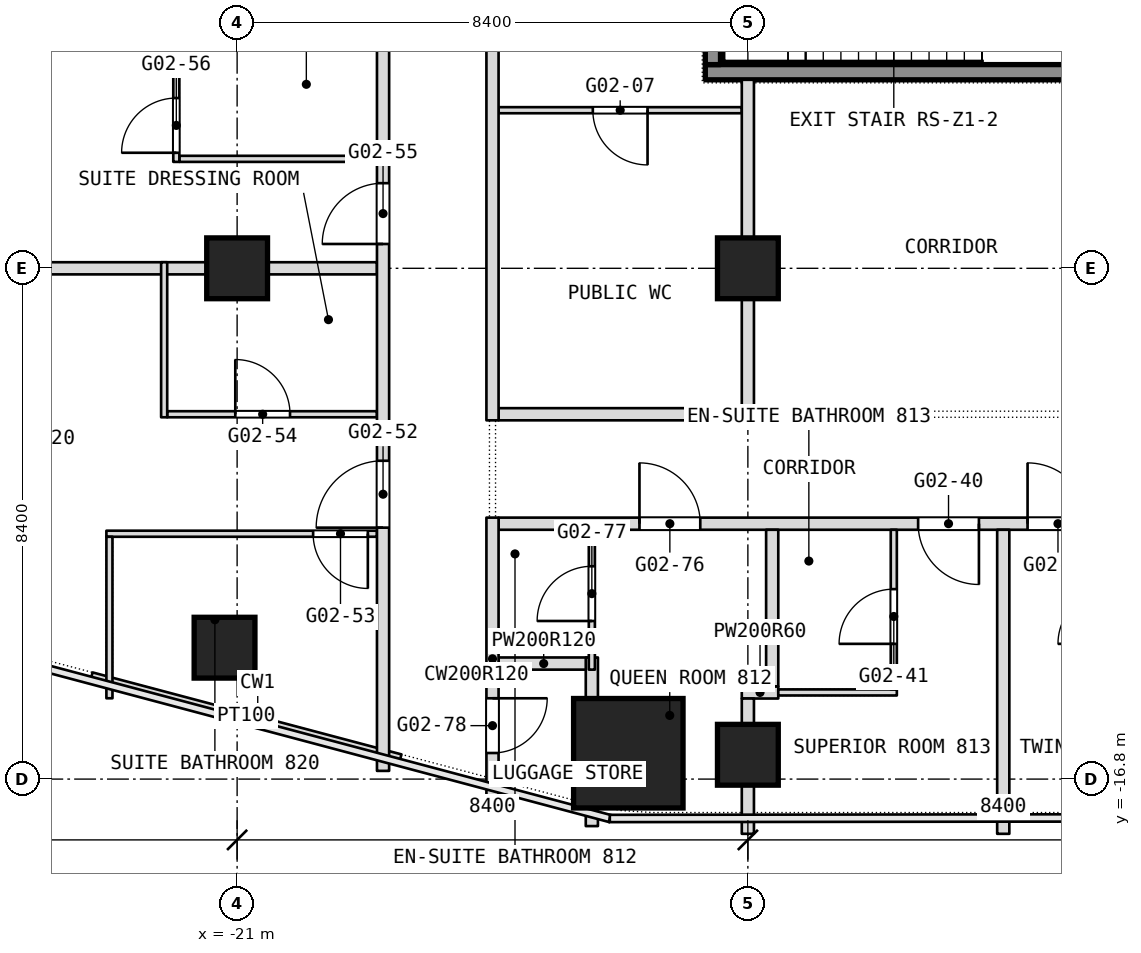
"""IFC4 building model, lengths in metres.
Left out: names, types, materials, properties, quantities, classifications, styles, units other than length and angle.
Written with IfcOpenShell. Run it as: python <this file> out.ifc"""

import sys

from ifc_helpers import new_model, si_unit, direction, frame, frame_2d, origin, origin_2d, place, context, subcontext, project, spatial, rectangle, extrude, element, fill, save


model = new_model("IFC4")
c1 = context("Model", 3, precision=1e-05, world=origin(), true_north=direction((0.0, 1.0)))
c2 = subcontext(c1, "Body", "Model", "MODEL_VIEW")
j1 = project(units=[si_unit("LENGTHUNIT", "METRE"), si_unit("PLANEANGLEUNIT", "RADIAN")], contexts=[c1])
p1 = place(None, origin())
s1 = spatial("IfcSite", under=j1, at=p1, CompositionType="ELEMENT")
p2 = place(p1, origin())
s2 = spatial("IfcBuilding", under=s1, at=p2, CompositionType="ELEMENT")
p3 = place(p2, frame((0.0, 0.0, 43.7)))
s3 = spatial("IfcBuildingStorey", under=s2, at=p3, CompositionType="ELEMENT", Elevation=43.7)
p4 = place(p3, frame((-14.566, -16.375, 0.0), z_axis=(0.0, 0.0, 1.0), x_axis=(1.0, 0.0, 0.0)))
e1 = element("IfcColumn", 1, at=p4, inside=s3, PredefinedType="COLUMN", context=c2, shape_type="SweptSolid", body=[
    extrude(rectangle(XDim=1.8, YDim=1.8, at=origin_2d()), origin(), (0.0, 0.0, 1.0), 3.6),
])
for number, where, z_axis, x_axis in (
    (2, (-21.0, -8.4, 0.0), (0.0, 0.0, 1.0), (1.0, 0.0, 0.0)),
    (3, (-12.6, -8.4, 0.0), (0.0, 0.0, 1.0), (1.0, 0.0, 0.0)),
    (4, (-12.6, -16.4, 0.0), (0.0, 0.0, 1.0), (1.0, 0.0, 0.0)),
    (5, (-21.207, -14.639, 0.0), (0.0, 0.0, 1.0), (1.0, 0.0, 0.0)),
):
    element("IfcColumn", number, at=place(p3, frame(where, z_axis=z_axis, x_axis=x_axis)), inside=s3, PredefinedType="COLUMN", context=c2, shape_type="SweptSolid", body=[
        extrude(rectangle(XDim=1.0, YDim=1.0, at=origin_2d()), origin(), (0.0, 0.0, 1.0), 3.6),
    ])
p5 = place(p3, frame((-23.39, -15.094, 0.0), z_axis=(0.0, 0.0, 1.0), x_axis=(0.966552628131, -0.256468354876, 0.0)))
e6 = element("IfcWall", 6, at=p5, inside=s3, PredefinedType="PARTITIONING", context=c2, shape_type="SweptSolid", body=[
    extrude(rectangle(XDim=5.256, YDim=0.1, at=frame_2d((2.628, 0.0))), origin(), (0.0, 0.0, 1.0), 3.34),
])
p6 = place(p3, frame((-12.7, -15.375, 0.0), z_axis=(0.0, 0.0, 1.0), x_axis=(1.0, 0.0, 0.0)))
e7 = element("IfcWall", 7, at=p6, inside=s3, PredefinedType="PARTITIONING", context=c2, shape_type="SweptSolid", body=[
    extrude(rectangle(XDim=0.6, YDim=0.2, at=frame_2d((0.3, 0.0))), origin(), (0.0, 0.0, 1.0), 3.34),
])
p7 = place(p3, frame((-12.1, -15.375, 0.0), z_axis=(0.0, 0.0, 1.0), x_axis=(1.0, 0.0, 0.0)))
e8 = element("IfcWall", 8, at=p7, inside=s3, PredefinedType="PARTITIONING", context=c2, shape_type="SweptSolid", body=[
    extrude(rectangle(XDim=1.95, YDim=0.1, at=frame_2d((0.975, 0.0))), origin(), (0.0, 0.0, 1.0), 3.34),
])
p8 = place(p3, frame((-16.7, -14.9, 0.0), z_axis=(0.0, 0.0, 1.0), x_axis=(1.0, 0.0, 0.0)))
e9 = element("IfcWall", 9, at=p8, inside=s3, PredefinedType="PARTITIONING", context=c2, shape_type="SweptSolid", body=[
    extrude(rectangle(XDim=1.484, YDim=0.2, at=frame_2d((0.742, 0.0))), origin(), (0.0, 0.0, 1.0), 3.34),
])
p9 = place(p3, frame((-23.15, -12.765, 0.0), z_axis=(0.0, 0.0, 1.0), x_axis=(1.0, 0.0, 0.0)))
e10 = element("IfcWall", 10, at=p9, inside=s3, PredefinedType="PARTITIONING", context=c2, shape_type="SweptSolid", body=[
    extrude(rectangle(XDim=4.45, YDim=0.1, at=frame_2d((2.225, 0.0))), origin(), (0.0, 0.0, 1.0), 3.34),
])
p10 = place(p9, frame((3.4, 0.0, 0.0)))
e11 = element("IfcOpeningElement", 11, at=p10, cuts=e10, PredefinedType="OPENING", context=c2, shape_type="SweptSolid", body=[
    extrude(rectangle(XDim=0.9, YDim=2.1, at=frame_2d((0.45, 1.05))), frame((0.0, 0.05, 0.0), z_axis=(0.0, -1.0, 0.0), x_axis=(1.0, 0.0, 0.0)), (0.0, 0.0, 1.0), 0.1),
])
p11 = place(p3, frame((-16.7, -12.6, 0.0), z_axis=(0.0, 0.0, 1.0), x_axis=(1.0, 0.0, 0.0)))
e12 = element("IfcWall", 12, at=p11, inside=s3, PredefinedType="PARTITIONING", context=c2, shape_type="SweptSolid", body=[
    extrude(rectangle(XDim=33.4, YDim=0.2, at=frame_2d((16.7, 0.0))), origin(), (0.0, 0.0, 1.0), 3.34),
])
p12 = place(p11, frame((6.9, 0.0, 0.0)))
e13 = element("IfcOpeningElement", 13, at=p12, cuts=e12, PredefinedType="OPENING", context=c2, shape_type="SweptSolid", body=[
    extrude(rectangle(XDim=1.0, YDim=2.1, at=frame_2d((0.5, 1.05))), frame((0.0, 0.1, 0.0), z_axis=(0.0, -1.0, 0.0), x_axis=(1.0, 0.0, 0.0)), (0.0, 0.0, 1.0), 0.2),
])
p13 = place(p11, frame((8.7, 0.0, 0.0)))
e14 = element("IfcOpeningElement", 14, at=p13, cuts=e12, PredefinedType="OPENING", context=c2, shape_type="SweptSolid", body=[
    extrude(rectangle(XDim=1.0, YDim=2.1, at=frame_2d((0.5, 1.05))), frame((0.0, 0.1, 0.0), z_axis=(0.0, -1.0, 0.0), x_axis=(1.0, 0.0, 0.0)), (0.0, 0.0, 1.0), 0.2),
])
p14 = place(p11, frame((12.9, 0.0, 0.0)))
e15 = element("IfcOpeningElement", 15, at=p14, cuts=e12, PredefinedType="OPENING", context=c2, shape_type="SweptSolid", body=[
    extrude(rectangle(XDim=1.0, YDim=2.1, at=frame_2d((0.5, 1.05))), frame((0.0, 0.1, 0.0), z_axis=(0.0, -1.0, 0.0), x_axis=(1.0, 0.0, 0.0)), (0.0, 0.0, 1.0), 0.2),
])
p15 = place(p11, frame((19.5, 0.0, 0.0)))
e16 = element("IfcOpeningElement", 16, at=p15, cuts=e12, PredefinedType="OPENING", context=c2, shape_type="SweptSolid", body=[
    extrude(rectangle(XDim=1.0, YDim=2.1, at=frame_2d((0.5, 1.05))), frame((0.0, 0.1, 0.0), z_axis=(0.0, -1.0, 0.0), x_axis=(1.0, 0.0, 0.0)), (0.0, 0.0, 1.0), 0.2),
])
p16 = place(p11, frame((23.7, 0.0, 0.0)))
e17 = element("IfcOpeningElement", 17, at=p16, cuts=e12, PredefinedType="OPENING", context=c2, shape_type="SweptSolid", body=[
    extrude(rectangle(XDim=1.0, YDim=2.1, at=frame_2d((0.5, 1.05))), frame((0.0, 0.1, 0.0), z_axis=(0.0, -1.0, 0.0), x_axis=(1.0, 0.0, 0.0)), (0.0, 0.0, 1.0), 0.2),
])
p17 = place(p11, frame((25.5, 0.0, 0.0)))
e18 = element("IfcOpeningElement", 18, at=p17, cuts=e12, PredefinedType="OPENING", context=c2, shape_type="SweptSolid", body=[
    extrude(rectangle(XDim=1.0, YDim=2.1, at=frame_2d((0.5, 1.05))), frame((0.0, 0.1, 0.0), z_axis=(0.0, -1.0, 0.0), x_axis=(1.0, 0.0, 0.0)), (0.0, 0.0, 1.0), 0.2),
])
p18 = place(p11, frame((2.317, 0.0, 0.0)))
e19 = element("IfcOpeningElement", 19, at=p18, cuts=e12, PredefinedType="OPENING", context=c2, shape_type="SweptSolid", body=[
    extrude(rectangle(XDim=1.0, YDim=2.1, at=frame_2d((0.5, 1.05))), frame((0.0, 0.1, 0.0), z_axis=(0.0, -1.0, 0.0), x_axis=(1.0, 0.0, 0.0)), (0.0, 0.0, 1.0), 0.2),
])
p19 = place(p11, frame((30.083, 0.0, 0.0)))
e20 = element("IfcOpeningElement", 20, at=p19, cuts=e12, PredefinedType="OPENING", context=c2, shape_type="SweptSolid", body=[
    extrude(rectangle(XDim=1.0, YDim=2.1, at=frame_2d((0.5, 1.05))), frame((0.0, 0.1, 0.0), z_axis=(0.0, -1.0, 0.0), x_axis=(1.0, 0.0, 0.0)), (0.0, 0.0, 1.0), 0.2),
])
p20 = place(p3, frame((-22.15, -10.8, 0.0), z_axis=(0.0, 0.0, 1.0), x_axis=(1.0, 0.0, 0.0)))
e21 = element("IfcWall", 21, at=p20, inside=s3, PredefinedType="PARTITIONING", context=c2, shape_type="SweptSolid", body=[
    extrude(rectangle(XDim=3.45, YDim=0.1, at=frame_2d((1.725, 0.0))), origin(), (0.0, 0.0, 1.0), 3.34),
])
p21 = place(p20, frame((1.12, 0.0, 0.0)))
e22 = element("IfcOpeningElement", 22, at=p21, cuts=e21, PredefinedType="OPENING", context=c2, shape_type="SweptSolid", body=[
    extrude(rectangle(XDim=0.9, YDim=2.1, at=frame_2d((0.45, 1.05))), frame((0.0, 0.05, 0.0), z_axis=(0.0, -1.0, 0.0), x_axis=(1.0, 0.0, 0.0)), (0.0, 0.0, 1.0), 0.1),
])
p22 = place(p3, frame((-16.7, -10.8, 0.0), z_axis=(0.0, 0.0, 1.0), x_axis=(1.0, 0.0, 0.0)))
e23 = element("IfcWall", 23, at=p22, inside=s3, PredefinedType="PARTITIONING", context=c2, shape_type="SweptSolid", body=[
    extrude(rectangle(XDim=4.0, YDim=0.2, at=frame_2d((2.0, 0.0))), origin(), (0.0, 0.0, 1.0), 3.34),
])
p23 = place(p3, frame((-29.7, -8.4, 0.0), z_axis=(0.0, 0.0, 1.0), x_axis=(1.0, 0.0, 0.0)))
e24 = element("IfcWall", 24, at=p23, inside=s3, PredefinedType="PARTITIONING", context=c2, shape_type="SweptSolid", body=[
    extrude(rectangle(XDim=11.0, YDim=0.2, at=frame_2d((5.5, 0.0))), origin(), (0.0, 0.0, 1.0), 2.84),
])
p24 = place(p3, frame((-21.95, -6.6, 0.0), z_axis=(0.0, 0.0, 1.0), x_axis=(1.0, 0.0, 0.0)))
e25 = element("IfcWall", 25, at=p24, inside=s3, PredefinedType="PARTITIONING", context=c2, shape_type="SweptSolid", body=[
    extrude(rectangle(XDim=3.25, YDim=0.1, at=frame_2d((1.625, 0.0))), origin(), (0.0, 0.0, 1.0), 3.34),
])
p25 = place(p3, frame((-16.7, -5.8, 0.0), z_axis=(0.0, 0.0, 1.0), x_axis=(1.0, 0.0, 0.0)))
e26 = element("IfcWall", 26, at=p25, inside=s3, PredefinedType="PARTITIONING", context=c2, shape_type="SweptSolid", body=[
    extrude(rectangle(XDim=4.0, YDim=0.1, at=frame_2d((2.0, 0.0))), origin(), (0.0, 0.0, 1.0), 3.34),
])
p26 = place(p25, frame((1.55, 0.0, 0.0)))
e27 = element("IfcOpeningElement", 27, at=p26, cuts=e26, PredefinedType="OPENING", context=c2, shape_type="SweptSolid", body=[
    extrude(rectangle(XDim=0.9, YDim=2.1, at=frame_2d((0.45, 1.05))), frame((0.0, 0.05, 0.0), z_axis=(0.0, -1.0, 0.0), x_axis=(1.0, 0.0, 0.0)), (0.0, 0.0, 1.0), 0.1),
])
p27 = place(p3, frame((-8.4, -17.7, 0.0), z_axis=(0.0, 0.0, 1.0), x_axis=(0.0, 1.0, 0.0)))
e28 = element("IfcWall", 28, at=p27, inside=s3, PredefinedType="PARTITIONING", context=c2, shape_type="SweptSolid", body=[
    extrude(rectangle(XDim=5.0, YDim=0.2, at=frame_2d((2.5, 0.0))), origin(), (0.0, 0.0, 1.0), 3.34),
])
p28 = place(p3, frame((-10.2, -15.325, 0.0), z_axis=(0.0, 0.0, 1.0), x_axis=(0.0, 1.0, 0.0)))
e29 = element("IfcWall", 29, at=p28, inside=s3, PredefinedType="PARTITIONING", context=c2, shape_type="SweptSolid", body=[
    extrude(rectangle(XDim=2.625, YDim=0.1, at=frame_2d((1.312, 0.0))), origin(), (0.0, 0.0, 1.0), 3.34),
])
p29 = place(p28, frame((0.749, 0.0, 0.0)))
e30 = element("IfcOpeningElement", 30, at=p29, cuts=e29, PredefinedType="OPENING", context=c2, shape_type="SweptSolid", body=[
    extrude(rectangle(XDim=0.9, YDim=2.1, at=frame_2d((0.45, 1.05))), frame((0.0, 0.05, 0.0), z_axis=(0.0, -1.0, 0.0), x_axis=(1.0, 0.0, 0.0)), (0.0, 0.0, 1.0), 0.1),
])
p30 = place(p3, frame((-12.2, -15.275, 0.0), z_axis=(0.0, 0.0, 1.0), x_axis=(0.0, 1.0, 0.0)))
e31 = element("IfcWall", 31, at=p30, inside=s3, PredefinedType="PARTITIONING", context=c2, shape_type="SweptSolid", body=[
    extrude(rectangle(XDim=2.575, YDim=0.2, at=frame_2d((1.288, 0.0))), origin(), (0.0, 0.0, 1.0), 3.34),
])
p31 = place(p3, frame((-12.6, -17.7, 0.0), z_axis=(0.0, 0.0, 1.0), x_axis=(0.0, 1.0, 0.0)))
e32 = element("IfcWall", 32, at=p31, inside=s3, PredefinedType="PARTITIONING", context=c2, shape_type="SweptSolid", body=[
    extrude(rectangle(XDim=2.225, YDim=0.2, at=frame_2d((1.112, 0.0))), origin(), (0.0, 0.0, 1.0), 3.34),
])
p32 = place(p3, frame((-12.6, -10.9, 0.0), z_axis=(0.0, 0.0, 1.0), x_axis=(0.0, 1.0, 0.0)))
e33 = element("IfcWall", 33, at=p32, inside=s3, PredefinedType="PARTITIONING", context=c2, shape_type="SweptSolid", body=[
    extrude(rectangle(XDim=5.6, YDim=0.2, at=frame_2d((2.8, 0.0))), origin(), (0.0, 0.0, 1.0), 3.34),
])
p33 = place(p3, frame((-15.166, -17.573, 0.0), z_axis=(0.0, 0.0, 1.0), x_axis=(0.0, 1.0, 0.0)))
e34 = element("IfcWall", 34, at=p33, inside=s3, PredefinedType="PARTITIONING", context=c2, shape_type="SweptSolid", body=[
    extrude(rectangle(XDim=0.298, YDim=0.2, at=frame_2d((0.149, 0.0))), origin(), (0.0, 0.0, 1.0), 3.34),
])
p34 = place(p3, frame((-15.166, -15.475, 0.0), z_axis=(0.0, 0.0, 1.0), x_axis=(0.0, 1.0, 0.0)))
e35 = element("IfcWall", 35, at=p34, inside=s3, PredefinedType="PARTITIONING", context=c2, shape_type="SweptSolid", body=[
    extrude(rectangle(XDim=0.675, YDim=0.2, at=frame_2d((0.337, 0.0))), origin(), (0.0, 0.0, 1.0), 3.34),
])
p35 = place(p3, frame((-15.166, -15.0, 0.0), z_axis=(0.0, 0.0, 1.0), x_axis=(0.0, 1.0, 0.0)))
e36 = element("IfcWall", 36, at=p35, inside=s3, PredefinedType="PARTITIONING", context=c2, shape_type="SweptSolid", body=[
    extrude(rectangle(XDim=2.3, YDim=0.1, at=frame_2d((1.15, 0.0))), origin(), (0.0, 0.0, 1.0), 3.34),
])
p36 = place(p35, frame((0.8, 0.0, 0.0)))
e37 = element("IfcOpeningElement", 37, at=p36, cuts=e36, PredefinedType="OPENING", context=c2, shape_type="SweptSolid", body=[
    extrude(rectangle(XDim=0.9, YDim=2.1, at=frame_2d((0.45, 1.05))), frame((0.0, 0.05, 0.0), z_axis=(0.0, -1.0, 0.0), x_axis=(1.0, 0.0, 0.0)), (0.0, 0.0, 1.0), 0.1),
])
p37 = place(p3, frame((-16.8, -17.143, 0.0), z_axis=(0.0, 0.0, 1.0), x_axis=(0.0, 1.0, 0.0)))
e38 = element("IfcWall", 38, at=p37, inside=s3, PredefinedType="PARTITIONING", context=c2, shape_type="SweptSolid", body=[
    extrude(rectangle(XDim=4.643, YDim=0.2, at=frame_2d((2.322, 0.0))), origin(), (0.0, 0.0, 1.0), 3.34),
])
p38 = place(p37, frame((0.772, 0.0, 0.0)))
e39 = element("IfcOpeningElement", 39, at=p38, cuts=e38, PredefinedType="OPENING", context=c2, shape_type="SweptSolid", body=[
    extrude(rectangle(XDim=0.9, YDim=2.1, at=frame_2d((0.45, 1.05))), frame((0.0, 0.1, 0.0), z_axis=(0.0, -1.0, 0.0), x_axis=(1.0, 0.0, 0.0)), (0.0, 0.0, 1.0), 0.2),
])
p39 = place(p3, frame((-16.8, -10.9, 0.0), z_axis=(0.0, 0.0, 1.0), x_axis=(0.0, 1.0, 0.0)))
e40 = element("IfcWall", 40, at=p39, inside=s3, PredefinedType="PARTITIONING", context=c2, shape_type="SweptSolid", body=[
    extrude(rectangle(XDim=9.0, YDim=0.2, at=frame_2d((4.5, 0.0))), origin(), (0.0, 0.0, 1.0), 3.34),
])
p40 = place(p3, frame((-18.6, -16.665, 0.0), z_axis=(0.0, 0.0, 1.0), x_axis=(0.0, 1.0, 0.0)))
e41 = element("IfcWall", 41, at=p40, inside=s3, PredefinedType="PARTITIONING", context=c2, shape_type="SweptSolid", body=[
    extrude(rectangle(XDim=23.565, YDim=0.2, at=frame_2d((11.782, 0.0))), origin(), (0.0, 0.0, 1.0), 3.34),
])
p41 = place(p40, frame((4.0, 0.0, 0.0)))
e42 = element("IfcOpeningElement", 42, at=p41, cuts=e41, PredefinedType="OPENING", context=c2, shape_type="SweptSolid", body=[
    extrude(rectangle(XDim=1.1, YDim=2.1, at=frame_2d((0.55, 1.05))), frame((0.0, 0.1, 0.0), z_axis=(0.0, -1.0, 0.0), x_axis=(1.0, 0.0, 0.0)), (0.0, 0.0, 1.0), 0.2),
])
p42 = place(p40, frame((8.665, 0.0, 0.0)))
e43 = element("IfcOpeningElement", 43, at=p42, cuts=e41, PredefinedType="OPENING", context=c2, shape_type="SweptSolid", body=[
    extrude(rectangle(XDim=1.0, YDim=2.1, at=frame_2d((0.5, 1.05))), frame((0.0, 0.1, 0.0), z_axis=(0.0, -1.0, 0.0), x_axis=(1.0, 0.0, 0.0)), (0.0, 0.0, 1.0), 0.2),
])
p43 = place(p40, frame((15.265, 0.0, 0.0)))
e44 = element("IfcOpeningElement", 44, at=p43, cuts=e41, PredefinedType="OPENING", context=c2, shape_type="SweptSolid", body=[
    extrude(rectangle(XDim=1.0, YDim=2.1, at=frame_2d((0.5, 1.05))), frame((0.0, 0.1, 0.0), z_axis=(0.0, -1.0, 0.0), x_axis=(1.0, 0.0, 0.0)), (0.0, 0.0, 1.0), 0.2),
])
p44 = place(p40, frame((19.465, 0.0, 0.0)))
e45 = element("IfcOpeningElement", 45, at=p44, cuts=e41, PredefinedType="OPENING", context=c2, shape_type="SweptSolid", body=[
    extrude(rectangle(XDim=1.0, YDim=2.1, at=frame_2d((0.5, 1.05))), frame((0.0, 0.1, 0.0), z_axis=(0.0, -1.0, 0.0), x_axis=(1.0, 0.0, 0.0)), (0.0, 0.0, 1.0), 0.2),
])
p45 = place(p3, frame((-22.0, -6.65, 0.0), z_axis=(0.0, 0.0, 1.0), x_axis=(0.0, 1.0, 0.0)))
e46 = element("IfcWall", 46, at=p45, inside=s3, PredefinedType="PARTITIONING", context=c2, shape_type="SweptSolid", body=[
    extrude(rectangle(XDim=2.55, YDim=0.1, at=frame_2d((1.275, 0.0))), origin(), (0.0, 0.0, 1.0), 3.34),
])
p46 = place(p45, frame((0.15, 0.0, 0.0)))
e47 = element("IfcOpeningElement", 47, at=p46, cuts=e46, PredefinedType="OPENING", context=c2, shape_type="SweptSolid", body=[
    extrude(rectangle(XDim=0.9, YDim=2.1, at=frame_2d((0.45, 1.05))), frame((0.0, 0.05, 0.0), z_axis=(0.0, -1.0, 0.0), x_axis=(1.0, 0.0, 0.0)), (0.0, 0.0, 1.0), 0.1),
])
p47 = place(p3, frame((-22.2, -10.85, 0.0), z_axis=(0.0, 0.0, 1.0), x_axis=(0.0, 1.0, 0.0)))
e48 = element("IfcWall", 48, at=p47, inside=s3, PredefinedType="PARTITIONING", context=c2, shape_type="SweptSolid", body=[
    extrude(rectangle(XDim=2.55, YDim=0.1, at=frame_2d((1.275, 0.0))), origin(), (0.0, 0.0, 1.0), 3.34),
])
p48 = place(p3, frame((-23.1, -15.471, 0.0), z_axis=(0.0, 0.0, 1.0), x_axis=(0.0, 1.0, 0.0)))
e49 = element("IfcWall", 49, at=p48, inside=s3, PredefinedType="PARTITIONING", context=c2, shape_type="SweptSolid", body=[
    extrude(rectangle(XDim=2.656, YDim=0.1, at=frame_2d((1.328, 0.0))), origin(), (0.0, 0.0, 1.0), 3.34),
])
p49 = place(p3, frame((-13.3, -5.175, 0.1), z_axis=(0.0, 0.0, 1.0), x_axis=(1.0, 0.0, 0.0)))
e50 = element("IfcWall", 50, at=p49, inside=s3, PredefinedType="SHEAR", context=c2, shape_type="SweptSolid", body=[
    extrude(rectangle(XDim=6.2, YDim=0.25, at=frame_2d((3.1, 0.0))), origin(), (0.0, 0.0, 1.0), 3.6),
])
p50 = place(p3, frame((-13.175, -5.05, 0.1), z_axis=(0.0, 0.0, 1.0), x_axis=(0.0, 1.0, 0.0)))
e51 = element("IfcWall", 51, at=p50, inside=s3, PredefinedType="SHEAR", context=c2, shape_type="SweptSolid", body=[
    extrude(rectangle(XDim=2.9, YDim=0.25, at=frame_2d((1.45, 0.0))), origin(), (0.0, 0.0, 1.0), 3.6),
])
p51 = place(p10, origin())
e52 = element("IfcDoor", 52, at=p51, inside=s3, OperationType="SINGLE_SWING_LEFT", PredefinedType="DOOR", context=c2, shape_type="SweptSolid", body=[
    extrude(rectangle(XDim=0.9, YDim=2.1, at=frame_2d((0.45, 1.05))), frame((0.0, 0.025, 0.0), z_axis=(0.0, -1.0, 0.0), x_axis=(1.0, 0.0, 0.0)), (0.0, 0.0, 1.0), 0.05),
])
fill(e11, e52)
p52 = place(p12, origin())
e53 = element("IfcDoor", 53, at=p52, inside=s3, OperationType="SINGLE_SWING_RIGHT", PredefinedType="DOOR", context=c2, shape_type="SweptSolid", body=[
    extrude(rectangle(XDim=1.0, YDim=2.1, at=frame_2d((0.5, 1.05))), frame((0.0, 0.025, 0.0), z_axis=(0.0, -1.0, 0.0), x_axis=(1.0, 0.0, 0.0)), (0.0, 0.0, 1.0), 0.05),
])
fill(e13, e53)
p53 = place(p13, origin())
e54 = element("IfcDoor", 54, at=p53, inside=s3, OperationType="SINGLE_SWING_RIGHT", PredefinedType="DOOR", context=c2, shape_type="SweptSolid", body=[
    extrude(rectangle(XDim=1.0, YDim=2.1, at=frame_2d((0.5, 1.05))), frame((0.0, 0.025, 0.0), z_axis=(0.0, -1.0, 0.0), x_axis=(1.0, 0.0, 0.0)), (0.0, 0.0, 1.0), 0.05),
])
fill(e14, e54)
p54 = place(p18, origin())
e55 = element("IfcDoor", 55, at=p54, inside=s3, OperationType="SINGLE_SWING_RIGHT", PredefinedType="DOOR", context=c2, shape_type="SweptSolid", body=[
    extrude(rectangle(XDim=1.0, YDim=2.1, at=frame_2d((0.5, 1.05))), frame((0.0, 0.025, 0.0), z_axis=(0.0, -1.0, 0.0), x_axis=(1.0, 0.0, 0.0)), (0.0, 0.0, 1.0), 0.05),
])
fill(e19, e55)
p55 = place(p21, origin())
e56 = element("IfcDoor", 56, at=p55, inside=s3, OperationType="SINGLE_SWING_LEFT", PredefinedType="DOOR", context=c2, shape_type="SweptSolid", body=[
    extrude(rectangle(XDim=0.9, YDim=2.1, at=frame_2d((0.45, 1.05))), frame((0.0, 0.025, 0.0), z_axis=(0.0, -1.0, 0.0), x_axis=(1.0, 0.0, 0.0)), (0.0, 0.0, 1.0), 0.05),
])
fill(e22, e56)
p56 = place(p26, origin())
e57 = element("IfcDoor", 57, at=p56, inside=s3, OperationType="SINGLE_SWING_LEFT", PredefinedType="DOOR", context=c2, shape_type="SweptSolid", body=[
    extrude(rectangle(XDim=0.9, YDim=2.1, at=frame_2d((0.45, 1.05))), frame((0.0, 0.025, 0.0), z_axis=(0.0, -1.0, 0.0), x_axis=(1.0, 0.0, 0.0)), (0.0, 0.0, 1.0), 0.05),
])
fill(e27, e57)
p57 = place(p29, origin())
e58 = element("IfcDoor", 58, at=p57, inside=s3, OperationType="SINGLE_SWING_LEFT", PredefinedType="DOOR", context=c2, shape_type="SweptSolid", body=[
    extrude(rectangle(XDim=0.9, YDim=2.1, at=frame_2d((0.45, 1.05))), frame((0.0, 0.025, 0.0), z_axis=(0.0, -1.0, 0.0), x_axis=(1.0, 0.0, 0.0)), (0.0, 0.0, 1.0), 0.05),
])
fill(e30, e58)
p58 = place(p36, origin())
e59 = element("IfcDoor", 59, at=p58, inside=s3, OperationType="SINGLE_SWING_RIGHT", PredefinedType="DOOR", context=c2, shape_type="SweptSolid", body=[
    extrude(rectangle(XDim=0.9, YDim=2.1, at=frame_2d((0.45, 1.05))), frame((0.0, 0.025, 0.0), z_axis=(0.0, -1.0, 0.0), x_axis=(1.0, 0.0, 0.0)), (0.0, 0.0, 1.0), 0.05),
])
fill(e37, e59)
p59 = place(p38, origin())
e60 = element("IfcDoor", 60, at=p59, inside=s3, OperationType="SINGLE_SWING_LEFT", PredefinedType="DOOR", context=c2, shape_type="SweptSolid", body=[
    extrude(rectangle(XDim=0.9, YDim=2.1, at=frame_2d((0.45, 1.05))), frame((0.0, 0.025, 0.0), z_axis=(0.0, -1.0, 0.0), x_axis=(1.0, 0.0, 0.0)), (0.0, 0.0, 1.0), 0.05),
])
fill(e39, e60)
p60 = place(p41, origin())
e61 = element("IfcDoor", 61, at=p60, inside=s3, OperationType="SINGLE_SWING_LEFT", PredefinedType="DOOR", context=c2, shape_type="SweptSolid", body=[
    extrude(rectangle(XDim=1.1, YDim=2.1, at=frame_2d((0.55, 1.05))), frame((0.0, 0.025, 0.0), z_axis=(0.0, -1.0, 0.0), x_axis=(1.0, 0.0, 0.0)), (0.0, 0.0, 1.0), 0.05),
])
fill(e42, e61)
p61 = place(p42, origin())
e62 = element("IfcDoor", 62, at=p61, inside=s3, OperationType="SINGLE_SWING_RIGHT", PredefinedType="DOOR", context=c2, shape_type="SweptSolid", body=[
    extrude(rectangle(XDim=1.0, YDim=2.1, at=frame_2d((0.5, 1.05))), frame((0.0, 0.025, 0.0), z_axis=(0.0, -1.0, 0.0), x_axis=(1.0, 0.0, 0.0)), (0.0, 0.0, 1.0), 0.05),
])
fill(e43, e62)
p62 = place(p46, origin())
e63 = element("IfcDoor", 63, at=p62, inside=s3, OperationType="SINGLE_SWING_RIGHT", PredefinedType="DOOR", context=c2, shape_type="SweptSolid", body=[
    extrude(rectangle(XDim=0.9, YDim=2.1, at=frame_2d((0.45, 1.05))), frame((0.0, 0.025, 0.0), z_axis=(0.0, -1.0, 0.0), x_axis=(1.0, 0.0, 0.0)), (0.0, 0.0, 1.0), 0.05),
])
fill(e47, e63)
save(model, sys.argv[1])
